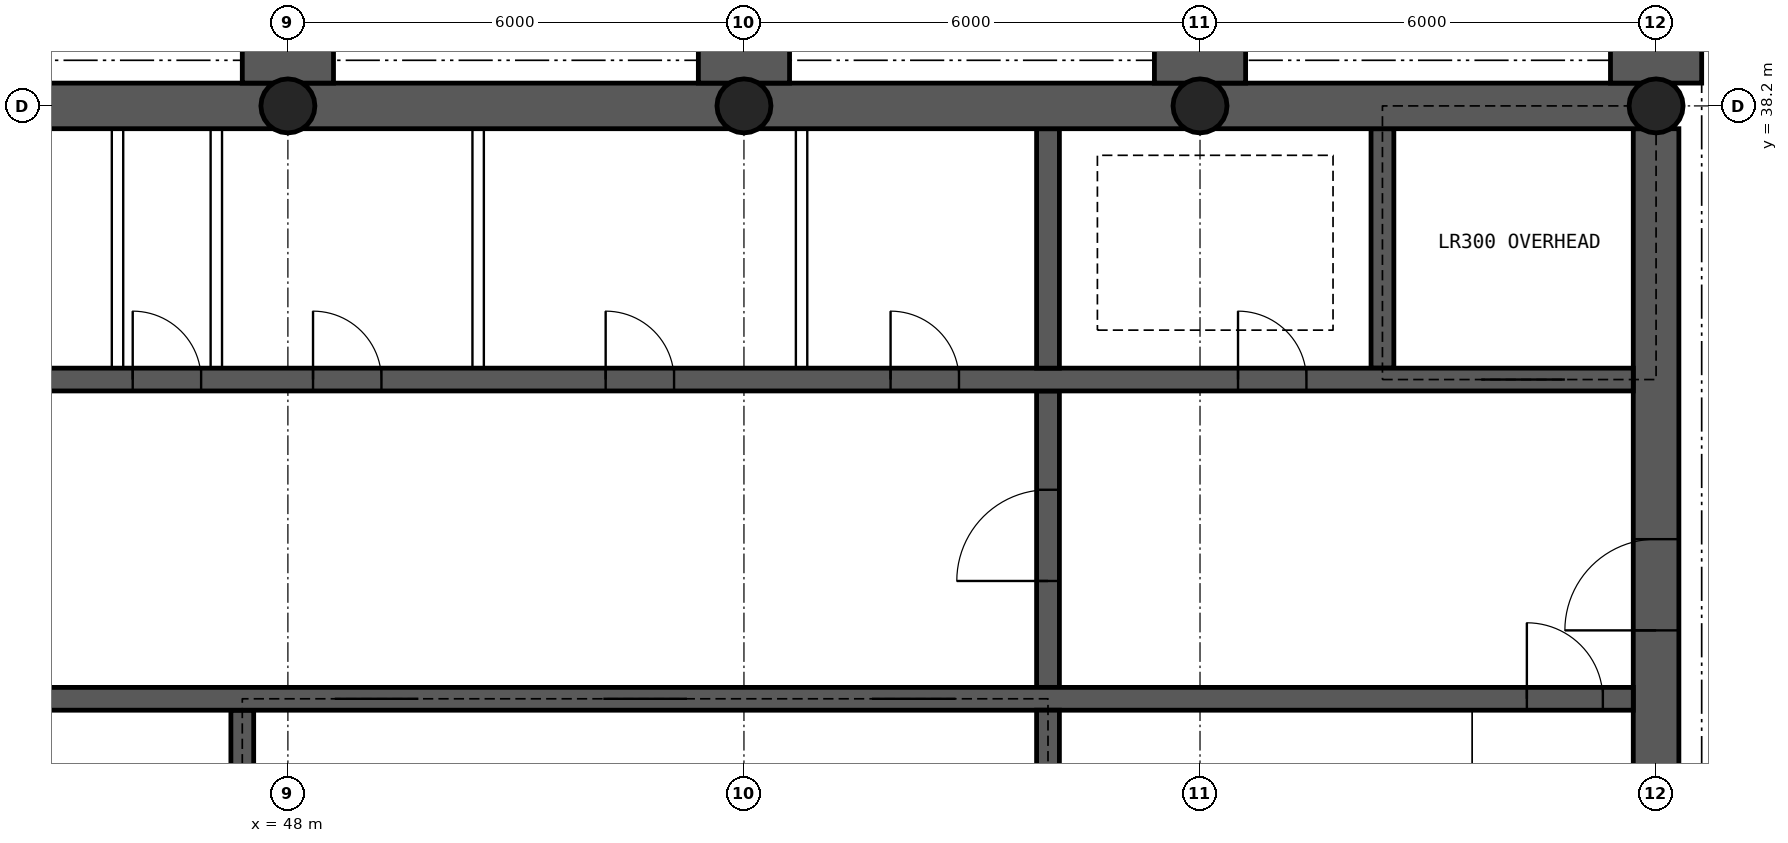
"""IFC4 building model, lengths in metres.
Left out: names, types, materials, properties, quantities, classifications, styles, units other than length and angle.
Written with IfcOpenShell. Run it as: python <this file> out.ifc"""

import sys

from ifc_helpers import new_model, si_unit, direction, frame, frame_2d, origin, origin_2d, place, context, subcontext, project, spatial, rectangle, hollow_circle, extrude, element, fill, save


model = new_model("IFC4")
c1 = context("Model", 3, precision=1e-05, world=origin(), true_north=direction((0.0, 1.0)))
c2 = subcontext(c1, "Body", "Model", "MODEL_VIEW")
j1 = project(units=[si_unit("LENGTHUNIT", "METRE"), si_unit("PLANEANGLEUNIT", "RADIAN")], contexts=[c1])
p1 = place(None, origin())
s1 = spatial("IfcSite", under=j1, at=p1, CompositionType="ELEMENT")
p2 = place(p1, origin())
s2 = spatial("IfcBuilding", under=s1, at=p2, CompositionType="ELEMENT")
p3 = place(p2, frame((0.0, 0.0, 262.3)))
s3 = spatial("IfcBuildingStorey", under=s2, at=p3, CompositionType="ELEMENT", Elevation=262.3)
p4 = place(p3, frame((18.0, 38.2, 0.0), z_axis=(0.0, 0.0, 1.0), x_axis=(1.0, 0.0, 0.0)))
e1 = element("IfcWall", 1, at=p4, inside=s3, PredefinedType="SHEAR", context=c2, shape_type="SweptSolid", body=[
    extrude(rectangle(XDim=48.0, YDim=0.6, at=frame_2d((24.0, 0.0))), origin(), (0.0, 0.0, 1.0), 6.0),
])
p5 = place(p3, frame((66.0, 26.1, 0.0), z_axis=(0.0, 0.0, 1.0), x_axis=(0.0, 1.0, 0.0)))
e2 = element("IfcWall", 2, at=p5, inside=s3, PredefinedType="SHEAR", context=c2, shape_type="SweptSolid", body=[
    extrude(rectangle(XDim=11.8, YDim=0.6, at=frame_2d((5.9, 0.0))), origin(), (0.0, 0.0, 1.0), 6.0),
])
p6 = place(p5, frame((5.2, 0.0, 0.0)))
e3 = element("IfcOpeningElement", 3, at=p6, cuts=e2, PredefinedType="OPENING", context=c2, shape_type="SweptSolid", body=[
    extrude(rectangle(XDim=1.2, YDim=2.1, at=frame_2d((0.6, 1.05))), frame((0.0, 0.31, 0.0), z_axis=(0.0, -1.0, 0.0), x_axis=(1.0, 0.0, 0.0)), (0.0, 0.0, 1.0), 0.62),
])
p7 = place(p3, frame((18.3, 30.4, 0.0), z_axis=(0.0, 0.0, 1.0), x_axis=(1.0, 0.0, 0.0)))
e4 = element("IfcWall", 4, at=p7, inside=s3, PredefinedType="SHEAR", context=c2, shape_type="SweptSolid", body=[
    extrude(rectangle(XDim=47.4, YDim=0.3, at=frame_2d((23.7, 0.0))), origin(), (0.0, 0.0, 1.0), 6.0),
])
p8 = place(p7, frame((0.4, 0.0, 0.0)))
e5 = element("IfcOpeningElement", 5, at=p8, cuts=e4, PredefinedType="OPENING", context=c2, shape_type="SweptSolid", body=[
    extrude(rectangle(XDim=1.0, YDim=2.1, at=frame_2d((0.5, 1.05))), frame((0.0, 0.16, 0.0), z_axis=(0.0, -1.0, 0.0), x_axis=(1.0, 0.0, 0.0)), (0.0, 0.0, 1.0), 0.32),
])
p9 = place(p7, frame((46.0, 0.0, 0.0)))
e6 = element("IfcOpeningElement", 6, at=p9, cuts=e4, PredefinedType="OPENING", context=c2, shape_type="SweptSolid", body=[
    extrude(rectangle(XDim=1.0, YDim=2.1, at=frame_2d((0.5, 1.05))), frame((0.0, 0.16, 0.0), z_axis=(0.0, -1.0, 0.0), x_axis=(1.0, 0.0, 0.0)), (0.0, 0.0, 1.0), 0.32),
])
p10 = place(p7, frame((19.025, 0.0, 0.0)))
e7 = element("IfcOpeningElement", 7, at=p10, cuts=e4, PredefinedType="OPENING", context=c2, shape_type="SweptSolid", body=[
    extrude(rectangle(XDim=0.9, YDim=2.1, at=frame_2d((0.45, 1.05))), frame((0.0, 0.16, 0.0), z_axis=(0.0, -1.0, 0.0), x_axis=(1.0, 0.0, 0.0)), (0.0, 0.0, 1.0), 0.32),
])
p11 = place(p7, frame((24.525, 0.0, 0.0)))
e8 = element("IfcOpeningElement", 8, at=p11, cuts=e4, PredefinedType="OPENING", context=c2, shape_type="SweptSolid", body=[
    extrude(rectangle(XDim=0.9, YDim=2.1, at=frame_2d((0.45, 1.05))), frame((0.0, 0.16, 0.0), z_axis=(0.0, -1.0, 0.0), x_axis=(1.0, 0.0, 0.0)), (0.0, 0.0, 1.0), 0.32),
])
p12 = place(p7, frame((30.317, 0.0, 0.0)))
e9 = element("IfcOpeningElement", 9, at=p12, cuts=e4, PredefinedType="OPENING", context=c2, shape_type="SweptSolid", body=[
    extrude(rectangle(XDim=1.1, YDim=2.1, at=frame_2d((0.55, 1.05))), frame((0.0, 0.16, 0.0), z_axis=(0.0, -1.0, 0.0), x_axis=(1.0, 0.0, 0.0)), (0.0, 0.0, 1.0), 0.32),
])
p13 = place(p7, frame((33.85, 0.0, 0.0)))
e10 = element("IfcOpeningElement", 10, at=p13, cuts=e4, PredefinedType="OPENING", context=c2, shape_type="SweptSolid", body=[
    extrude(rectangle(XDim=1.1, YDim=2.1, at=frame_2d((0.55, 1.05))), frame((0.0, 0.16, 0.0), z_axis=(0.0, -1.0, 0.0), x_axis=(1.0, 0.0, 0.0)), (0.0, 0.0, 1.0), 0.32),
])
p14 = place(p7, frame((37.383, 0.0, 0.0)))
e11 = element("IfcOpeningElement", 11, at=p14, cuts=e4, PredefinedType="OPENING", context=c2, shape_type="SweptSolid", body=[
    extrude(rectangle(XDim=1.1, YDim=2.1, at=frame_2d((0.55, 1.05))), frame((0.0, 0.16, 0.0), z_axis=(0.0, -1.0, 0.0), x_axis=(1.0, 0.0, 0.0)), (0.0, 0.0, 1.0), 0.32),
])
p15 = place(p3, frame((18.3, 34.6, 0.0), z_axis=(0.0, 0.0, 1.0), x_axis=(1.0, 0.0, 0.0)))
e12 = element("IfcWall", 12, at=p15, inside=s3, PredefinedType="SHEAR", context=c2, shape_type="SweptSolid", body=[
    extrude(rectangle(XDim=47.4, YDim=0.3, at=frame_2d((23.7, 0.0))), origin(), (0.0, 0.0, 1.0), 6.0),
])
p16 = place(p15, frame((0.9, 0.0, 0.0)))
e13 = element("IfcOpeningElement", 13, at=p16, cuts=e12, PredefinedType="OPENING", context=c2, shape_type="SweptSolid", body=[
    extrude(rectangle(XDim=1.1, YDim=2.1, at=frame_2d((0.55, 1.05))), frame((0.0, 0.16, 0.0), z_axis=(0.0, -1.0, 0.0), x_axis=(1.0, 0.0, 0.0)), (0.0, 0.0, 1.0), 0.32),
])
p17 = place(p15, frame((45.4, 0.0, 0.0)))
e14 = element("IfcOpeningElement", 14, at=p17, cuts=e12, PredefinedType="OPENING", context=c2, shape_type="SweptSolid", body=[
    extrude(rectangle(XDim=1.1, YDim=2.1, at=frame_2d((0.55, 1.05))), frame((0.0, 0.16, 0.0), z_axis=(0.0, -1.0, 0.0), x_axis=(1.0, 0.0, 0.0)), (0.0, 0.0, 1.0), 0.32),
])
p18 = place(p15, frame((4.3, 0.0, 0.0)))
e15 = element("IfcOpeningElement", 15, at=p18, cuts=e12, PredefinedType="OPENING", context=c2, shape_type="SweptSolid", body=[
    extrude(rectangle(XDim=0.9, YDim=2.1, at=frame_2d((0.45, 1.05))), frame((0.0, 0.16, 0.0), z_axis=(0.0, -1.0, 0.0), x_axis=(1.0, 0.0, 0.0)), (0.0, 0.0, 1.0), 0.32),
])
p19 = place(p15, frame((42.2, 0.0, 0.0)))
e16 = element("IfcOpeningElement", 16, at=p19, cuts=e12, PredefinedType="OPENING", context=c2, shape_type="SweptSolid", body=[
    extrude(rectangle(XDim=0.9, YDim=2.1, at=frame_2d((0.45, 1.05))), frame((0.0, 0.16, 0.0), z_axis=(0.0, -1.0, 0.0), x_axis=(1.0, 0.0, 0.0)), (0.0, 0.0, 1.0), 0.32),
])
p20 = place(p15, frame((9.075, 0.0, 0.0)))
e17 = element("IfcOpeningElement", 17, at=p20, cuts=e12, PredefinedType="OPENING", context=c2, shape_type="SweptSolid", body=[
    extrude(rectangle(XDim=0.9, YDim=2.1, at=frame_2d((0.45, 1.05))), frame((0.0, 0.16, 0.0), z_axis=(0.0, -1.0, 0.0), x_axis=(1.0, 0.0, 0.0)), (0.0, 0.0, 1.0), 0.32),
])
p21 = place(p15, frame((13.049, 0.0, 0.0)))
e18 = element("IfcOpeningElement", 18, at=p21, cuts=e12, PredefinedType="OPENING", context=c2, shape_type="SweptSolid", body=[
    extrude(rectangle(XDim=0.9, YDim=2.1, at=frame_2d((0.45, 1.05))), frame((0.0, 0.16, 0.0), z_axis=(0.0, -1.0, 0.0), x_axis=(1.0, 0.0, 0.0)), (0.0, 0.0, 1.0), 0.32),
])
p22 = place(p15, frame((16.696, 0.0, 0.0)))
e19 = element("IfcOpeningElement", 19, at=p22, cuts=e12, PredefinedType="OPENING", context=c2, shape_type="SweptSolid", body=[
    extrude(rectangle(XDim=0.9, YDim=2.1, at=frame_2d((0.45, 1.05))), frame((0.0, 0.16, 0.0), z_axis=(0.0, -1.0, 0.0), x_axis=(1.0, 0.0, 0.0)), (0.0, 0.0, 1.0), 0.32),
])
p23 = place(p15, frame((20.455, 0.0, 0.0)))
e20 = element("IfcOpeningElement", 20, at=p23, cuts=e12, PredefinedType="OPENING", context=c2, shape_type="SweptSolid", body=[
    extrude(rectangle(XDim=0.9, YDim=2.1, at=frame_2d((0.45, 1.05))), frame((0.0, 0.16, 0.0), z_axis=(0.0, -1.0, 0.0), x_axis=(1.0, 0.0, 0.0)), (0.0, 0.0, 1.0), 0.32),
])
p24 = place(p15, frame((24.861, 0.0, 0.0)))
e21 = element("IfcOpeningElement", 21, at=p24, cuts=e12, PredefinedType="OPENING", context=c2, shape_type="SweptSolid", body=[
    extrude(rectangle(XDim=0.9, YDim=2.1, at=frame_2d((0.45, 1.05))), frame((0.0, 0.16, 0.0), z_axis=(0.0, -1.0, 0.0), x_axis=(1.0, 0.0, 0.0)), (0.0, 0.0, 1.0), 0.32),
])
p25 = place(p15, frame((27.658, 0.0, 0.0)))
e22 = element("IfcOpeningElement", 22, at=p25, cuts=e12, PredefinedType="OPENING", context=c2, shape_type="SweptSolid", body=[
    extrude(rectangle(XDim=0.9, YDim=2.1, at=frame_2d((0.45, 1.05))), frame((0.0, 0.16, 0.0), z_axis=(0.0, -1.0, 0.0), x_axis=(1.0, 0.0, 0.0)), (0.0, 0.0, 1.0), 0.32),
])
p26 = place(p15, frame((30.031, 0.0, 0.0)))
e23 = element("IfcOpeningElement", 23, at=p26, cuts=e12, PredefinedType="OPENING", context=c2, shape_type="SweptSolid", body=[
    extrude(rectangle(XDim=0.9, YDim=2.1, at=frame_2d((0.45, 1.05))), frame((0.0, 0.16, 0.0), z_axis=(0.0, -1.0, 0.0), x_axis=(1.0, 0.0, 0.0)), (0.0, 0.0, 1.0), 0.32),
])
p27 = place(p15, frame((33.881, 0.0, 0.0)))
e24 = element("IfcOpeningElement", 24, at=p27, cuts=e12, PredefinedType="OPENING", context=c2, shape_type="SweptSolid", body=[
    extrude(rectangle(XDim=0.9, YDim=2.1, at=frame_2d((0.45, 1.05))), frame((0.0, 0.16, 0.0), z_axis=(0.0, -1.0, 0.0), x_axis=(1.0, 0.0, 0.0)), (0.0, 0.0, 1.0), 0.32),
])
p28 = place(p15, frame((37.629, 0.0, 0.0)))
e25 = element("IfcOpeningElement", 25, at=p28, cuts=e12, PredefinedType="OPENING", context=c2, shape_type="SweptSolid", body=[
    extrude(rectangle(XDim=0.9, YDim=2.1, at=frame_2d((0.45, 1.05))), frame((0.0, 0.16, 0.0), z_axis=(0.0, -1.0, 0.0), x_axis=(1.0, 0.0, 0.0)), (0.0, 0.0, 1.0), 0.32),
])
p29 = place(p3, frame((58.0, 26.1, 0.0), z_axis=(0.0, 0.0, 1.0), x_axis=(0.0, 1.0, 0.0)))
e26 = element("IfcWall", 26, at=p29, inside=s3, PredefinedType="SHEAR", context=c2, shape_type="SweptSolid", body=[
    extrude(rectangle(XDim=4.15, YDim=0.3, at=frame_2d((2.075, 0.0))), origin(), (0.0, 0.0, 1.0), 6.0),
])
p30 = place(p3, frame((58.0, 30.55, 0.0), z_axis=(0.0, 0.0, 1.0), x_axis=(0.0, 1.0, 0.0)))
e27 = element("IfcWall", 27, at=p30, inside=s3, PredefinedType="SHEAR", context=c2, shape_type="SweptSolid", body=[
    extrude(rectangle(XDim=3.9, YDim=0.3, at=frame_2d((1.95, 0.0))), origin(), (0.0, 0.0, 1.0), 6.0),
])
p31 = place(p30, frame((1.4, 0.0, 0.0)))
e28 = element("IfcOpeningElement", 28, at=p31, cuts=e27, PredefinedType="OPENING", context=c2, shape_type="SweptSolid", body=[
    extrude(rectangle(XDim=1.2, YDim=2.1, at=frame_2d((0.6, 1.05))), frame((0.0, 0.16, 0.0), z_axis=(0.0, -1.0, 0.0), x_axis=(1.0, 0.0, 0.0)), (0.0, 0.0, 1.0), 0.32),
])
for number, where, z_axis, x_axis in (
    (29, (62.4, 34.75, 0.0), (0.0, 0.0, 1.0), (0.0, 1.0, 0.0)),
    (30, (58.0, 34.75, 0.0), (0.0, 0.0, 1.0), (0.0, 1.0, 0.0)),
):
    element("IfcWall", number, at=place(p3, frame(where, z_axis=z_axis, x_axis=x_axis)), inside=s3, PredefinedType="SHEAR", context=c2, shape_type="SweptSolid", body=[
        extrude(rectangle(XDim=3.15, YDim=0.3, at=frame_2d((1.575, 0.0))), origin(), (0.0, 0.0, 1.0), 6.0),
    ])
p32 = place(p3, frame((47.4, 26.1, 0.0), z_axis=(0.0, 0.0, 1.0), x_axis=(0.0, 1.0, 0.0)))
e31 = element("IfcWall", 31, at=p32, inside=s3, PredefinedType="SHEAR", context=c2, shape_type="SweptSolid", body=[
    extrude(rectangle(XDim=4.15, YDim=0.3, at=frame_2d((2.075, 0.0))), origin(), (0.0, 0.0, 1.0), 6.0),
])
p33 = place(p3, frame((48.0, 38.5, 0.0), z_axis=(0.0, 0.0, 1.0), x_axis=(0.0, 1.0, 0.0)))
e32 = element("IfcWall", 32, at=p33, inside=s3, PredefinedType="SHEAR", context=c2, shape_type="SweptSolid", body=[
    extrude(rectangle(XDim=13.45, YDim=1.2, at=frame_2d((6.725, 0.0))), origin(), (0.0, 0.0, 1.0), 4.4),
])
p34 = place(p33, frame((6.2, 0.0, 0.0)))
e33 = element("IfcOpeningElement", 33, at=p34, cuts=e32, PredefinedType="OPENING", context=c2, shape_type="SweptSolid", body=[
    extrude(rectangle(XDim=1.0, YDim=2.1, at=frame_2d((0.5, 1.05))), frame((0.0, 0.61, 0.0), z_axis=(0.0, -1.0, 0.0), x_axis=(1.0, 0.0, 0.0)), (0.0, 0.0, 1.0), 1.22),
])
p35 = place(p3, frame((54.0, 38.5, 0.0), z_axis=(0.0, 0.0, 1.0), x_axis=(0.0, 1.0, 0.0)))
e34 = element("IfcWall", 34, at=p35, inside=s3, PredefinedType="SHEAR", context=c2, shape_type="SweptSolid", body=[
    extrude(rectangle(XDim=13.45, YDim=1.2, at=frame_2d((6.725, 0.0))), origin(), (0.0, 0.0, 1.0), 4.4),
])
p36 = place(p35, frame((6.2, 0.0, 0.0)))
e35 = element("IfcOpeningElement", 35, at=p36, cuts=e34, PredefinedType="OPENING", context=c2, shape_type="SweptSolid", body=[
    extrude(rectangle(XDim=1.0, YDim=2.1, at=frame_2d((0.5, 1.05))), frame((0.0, 0.61, 0.0), z_axis=(0.0, -1.0, 0.0), x_axis=(1.0, 0.0, 0.0)), (0.0, 0.0, 1.0), 1.22),
])
p37 = place(p3, frame((60.0, 38.5, 0.0), z_axis=(0.0, 0.0, 1.0), x_axis=(0.0, 1.0, 0.0)))
e36 = element("IfcWall", 36, at=p37, inside=s3, PredefinedType="SHEAR", context=c2, shape_type="SweptSolid", body=[
    extrude(rectangle(XDim=13.45, YDim=1.2, at=frame_2d((6.725, 0.0))), origin(), (0.0, 0.0, 1.0), 4.4),
])
p38 = place(p37, frame((6.2, 0.0, 0.0)))
e37 = element("IfcOpeningElement", 37, at=p38, cuts=e36, PredefinedType="OPENING", context=c2, shape_type="SweptSolid", body=[
    extrude(rectangle(XDim=1.0, YDim=2.1, at=frame_2d((0.5, 1.05))), frame((0.0, 0.61, 0.0), z_axis=(0.0, -1.0, 0.0), x_axis=(1.0, 0.0, 0.0)), (0.0, 0.0, 1.0), 1.22),
])
p39 = place(p3, frame((66.0, 38.5, 0.0), z_axis=(0.0, 0.0, 1.0), x_axis=(0.0, 1.0, 0.0)))
e38 = element("IfcWall", 38, at=p39, inside=s3, PredefinedType="SHEAR", context=c2, shape_type="SweptSolid", body=[
    extrude(rectangle(XDim=13.45, YDim=1.2, at=frame_2d((6.725, 0.0))), origin(), (0.0, 0.0, 1.0), 4.4),
])
p40 = place(p39, frame((6.2, 0.0, 0.0)))
e39 = element("IfcOpeningElement", 39, at=p40, cuts=e38, PredefinedType="OPENING", context=c2, shape_type="SweptSolid", body=[
    extrude(rectangle(XDim=1.0, YDim=2.1, at=frame_2d((0.5, 1.05))), frame((0.0, 0.61, 0.0), z_axis=(0.0, -1.0, 0.0), x_axis=(1.0, 0.0, 0.0)), (0.0, 0.0, 1.0), 1.22),
])
for number, where, z_axis, x_axis in (
    (40, (48.0, 38.2, 0.0), (0.0, 0.0, 1.0), (1.0, 0.0, 0.0)),
    (41, (54.0, 38.2, 0.0), (0.0, 0.0, 1.0), (1.0, 0.0, 0.0)),
    (42, (60.0, 38.2, 0.0), (0.0, 0.0, 1.0), (1.0, 0.0, 0.0)),
    (43, (66.0, 38.2, 0.0), (0.0, 0.0, 1.0), (1.0, 0.0, 0.0)),
):
    element("IfcColumn", number, at=place(p3, frame(where, z_axis=z_axis, x_axis=x_axis)), inside=s3, PredefinedType="COLUMN", context=c2, shape_type="SweptSolid", body=[
        extrude(hollow_circle(Radius=0.355, WallThickness=0.025, at=origin_2d()), origin(), (0.0, 0.0, 1.0), 11.517),
    ])
for number, where, z_axis, x_axis in (
    (44, (45.758, 34.75, 0.0), (0.0, 0.0, 1.0), (0.0, 1.0, 0.0)),
    (45, (47.058, 34.75, 0.0), (0.0, 0.0, 1.0), (0.0, 1.0, 0.0)),
    (46, (50.503, 34.75, 0.0), (0.0, 0.0, 1.0), (0.0, 1.0, 0.0)),
    (47, (54.758, 34.75, 0.0), (0.0, 0.0, 1.0), (0.0, 1.0, 0.0)),
):
    element("IfcWall", number, at=place(p3, frame(where, z_axis=z_axis, x_axis=x_axis)), inside=s3, PredefinedType="SOLIDWALL", context=c2, shape_type="SweptSolid", body=[
        extrude(rectangle(XDim=3.15, YDim=0.15, at=frame_2d((1.575, 0.0))), origin(), (0.0, 0.0, 1.0), 6.0),
    ])
p41 = place(p6, origin())
e48 = element("IfcDoor", 48, at=p41, inside=s3, OperationType="SINGLE_SWING_LEFT", PredefinedType="DOOR", context=c2, shape_type="SweptSolid", body=[
    extrude(rectangle(XDim=1.2, YDim=2.1, at=frame_2d((0.6, 1.05))), frame((0.0, 0.025, 0.0), z_axis=(0.0, -1.0, 0.0), x_axis=(1.0, 0.0, 0.0)), (0.0, 0.0, 1.0), 0.05),
])
fill(e3, e48)
p42 = place(p9, origin())
e49 = element("IfcDoor", 49, at=p42, inside=s3, OperationType="SINGLE_SWING_LEFT", PredefinedType="DOOR", context=c2, shape_type="SweptSolid", body=[
    extrude(rectangle(XDim=1.0, YDim=2.1, at=frame_2d((0.5, 1.05))), frame((0.0, 0.025, 0.0), z_axis=(0.0, -1.0, 0.0), x_axis=(1.0, 0.0, 0.0)), (0.0, 0.0, 1.0), 0.05),
])
fill(e6, e49)
p43 = place(p17, origin())
e50 = element("IfcDoor", 50, at=p43, inside=s3, OperationType="DOUBLE_DOOR_SLIDING", PredefinedType="DOOR", context=c2, shape_type="SweptSolid", body=[
    extrude(rectangle(XDim=1.1, YDim=2.1, at=frame_2d((0.55, 1.05))), frame((0.0, 0.025, 0.0), z_axis=(0.0, -1.0, 0.0), x_axis=(1.0, 0.0, 0.0)), (0.0, 0.0, 1.0), 0.05),
])
fill(e14, e50)
p44 = place(p19, origin())
e51 = element("IfcDoor", 51, at=p44, inside=s3, OperationType="SINGLE_SWING_LEFT", PredefinedType="DOOR", context=c2, shape_type="SweptSolid", body=[
    extrude(rectangle(XDim=0.9, YDim=2.1, at=frame_2d((0.45, 1.05))), frame((0.0, 0.025, 0.0), z_axis=(0.0, -1.0, 0.0), x_axis=(1.0, 0.0, 0.0)), (0.0, 0.0, 1.0), 0.05),
])
fill(e16, e51)
p45 = place(p31, origin())
e52 = element("IfcDoor", 52, at=p45, inside=s3, OperationType="SINGLE_SWING_LEFT", PredefinedType="DOOR", context=c2, shape_type="SweptSolid", body=[
    extrude(rectangle(XDim=1.2, YDim=2.1, at=frame_2d((0.6, 1.05))), frame((0.0, 0.025, 0.0), z_axis=(0.0, -1.0, 0.0), x_axis=(1.0, 0.0, 0.0)), (0.0, 0.0, 1.0), 0.05),
])
fill(e28, e52)
p46 = place(p25, origin())
e53 = element("IfcDoor", 53, at=p46, inside=s3, OperationType="SINGLE_SWING_LEFT", PredefinedType="DOOR", context=c2, shape_type="SweptSolid", body=[
    extrude(rectangle(XDim=0.9, YDim=2.1, at=frame_2d((0.45, 1.05))), frame((0.0, 0.025, 0.0), z_axis=(0.0, -1.0, 0.0), x_axis=(1.0, 0.0, 0.0)), (0.0, 0.0, 1.0), 0.05),
])
fill(e22, e53)
p47 = place(p26, origin())
e54 = element("IfcDoor", 54, at=p47, inside=s3, OperationType="SINGLE_SWING_LEFT", PredefinedType="DOOR", context=c2, shape_type="SweptSolid", body=[
    extrude(rectangle(XDim=0.9, YDim=2.1, at=frame_2d((0.45, 1.05))), frame((0.0, 0.025, 0.0), z_axis=(0.0, -1.0, 0.0), x_axis=(1.0, 0.0, 0.0)), (0.0, 0.0, 1.0), 0.05),
])
fill(e23, e54)
p48 = place(p27, origin())
e55 = element("IfcDoor", 55, at=p48, inside=s3, OperationType="SINGLE_SWING_LEFT", PredefinedType="DOOR", context=c2, shape_type="SweptSolid", body=[
    extrude(rectangle(XDim=0.9, YDim=2.1, at=frame_2d((0.45, 1.05))), frame((0.0, 0.025, 0.0), z_axis=(0.0, -1.0, 0.0), x_axis=(1.0, 0.0, 0.0)), (0.0, 0.0, 1.0), 0.05),
])
fill(e24, e55)
p49 = place(p28, origin())
e56 = element("IfcDoor", 56, at=p49, inside=s3, OperationType="SINGLE_SWING_LEFT", PredefinedType="DOOR", context=c2, shape_type="SweptSolid", body=[
    extrude(rectangle(XDim=0.9, YDim=2.1, at=frame_2d((0.45, 1.05))), frame((0.0, 0.025, 0.0), z_axis=(0.0, -1.0, 0.0), x_axis=(1.0, 0.0, 0.0)), (0.0, 0.0, 1.0), 0.05),
])
fill(e25, e56)
p50 = place(p12, origin())
e57 = element("IfcDoor", 57, at=p50, inside=s3, OperationType="DOUBLE_DOOR_SLIDING", PredefinedType="DOOR", context=c2, shape_type="SweptSolid", body=[
    extrude(rectangle(XDim=1.1, YDim=2.1, at=frame_2d((0.55, 1.05))), frame((0.0, 0.025, 0.0), z_axis=(0.0, -1.0, 0.0), x_axis=(1.0, 0.0, 0.0)), (0.0, 0.0, 1.0), 0.05),
])
fill(e9, e57)
p51 = place(p13, origin())
e58 = element("IfcDoor", 58, at=p51, inside=s3, OperationType="DOUBLE_DOOR_SLIDING", PredefinedType="DOOR", context=c2, shape_type="SweptSolid", body=[
    extrude(rectangle(XDim=1.1, YDim=2.1, at=frame_2d((0.55, 1.05))), frame((0.0, 0.025, 0.0), z_axis=(0.0, -1.0, 0.0), x_axis=(1.0, 0.0, 0.0)), (0.0, 0.0, 1.0), 0.05),
])
fill(e10, e58)
p52 = place(p14, origin())
e59 = element("IfcDoor", 59, at=p52, inside=s3, OperationType="DOUBLE_DOOR_SLIDING", PredefinedType="DOOR", context=c2, shape_type="SweptSolid", body=[
    extrude(rectangle(XDim=1.1, YDim=2.1, at=frame_2d((0.55, 1.05))), frame((0.0, 0.025, 0.0), z_axis=(0.0, -1.0, 0.0), x_axis=(1.0, 0.0, 0.0)), (0.0, 0.0, 1.0), 0.05),
])
fill(e11, e59)
save(model, sys.argv[1])
